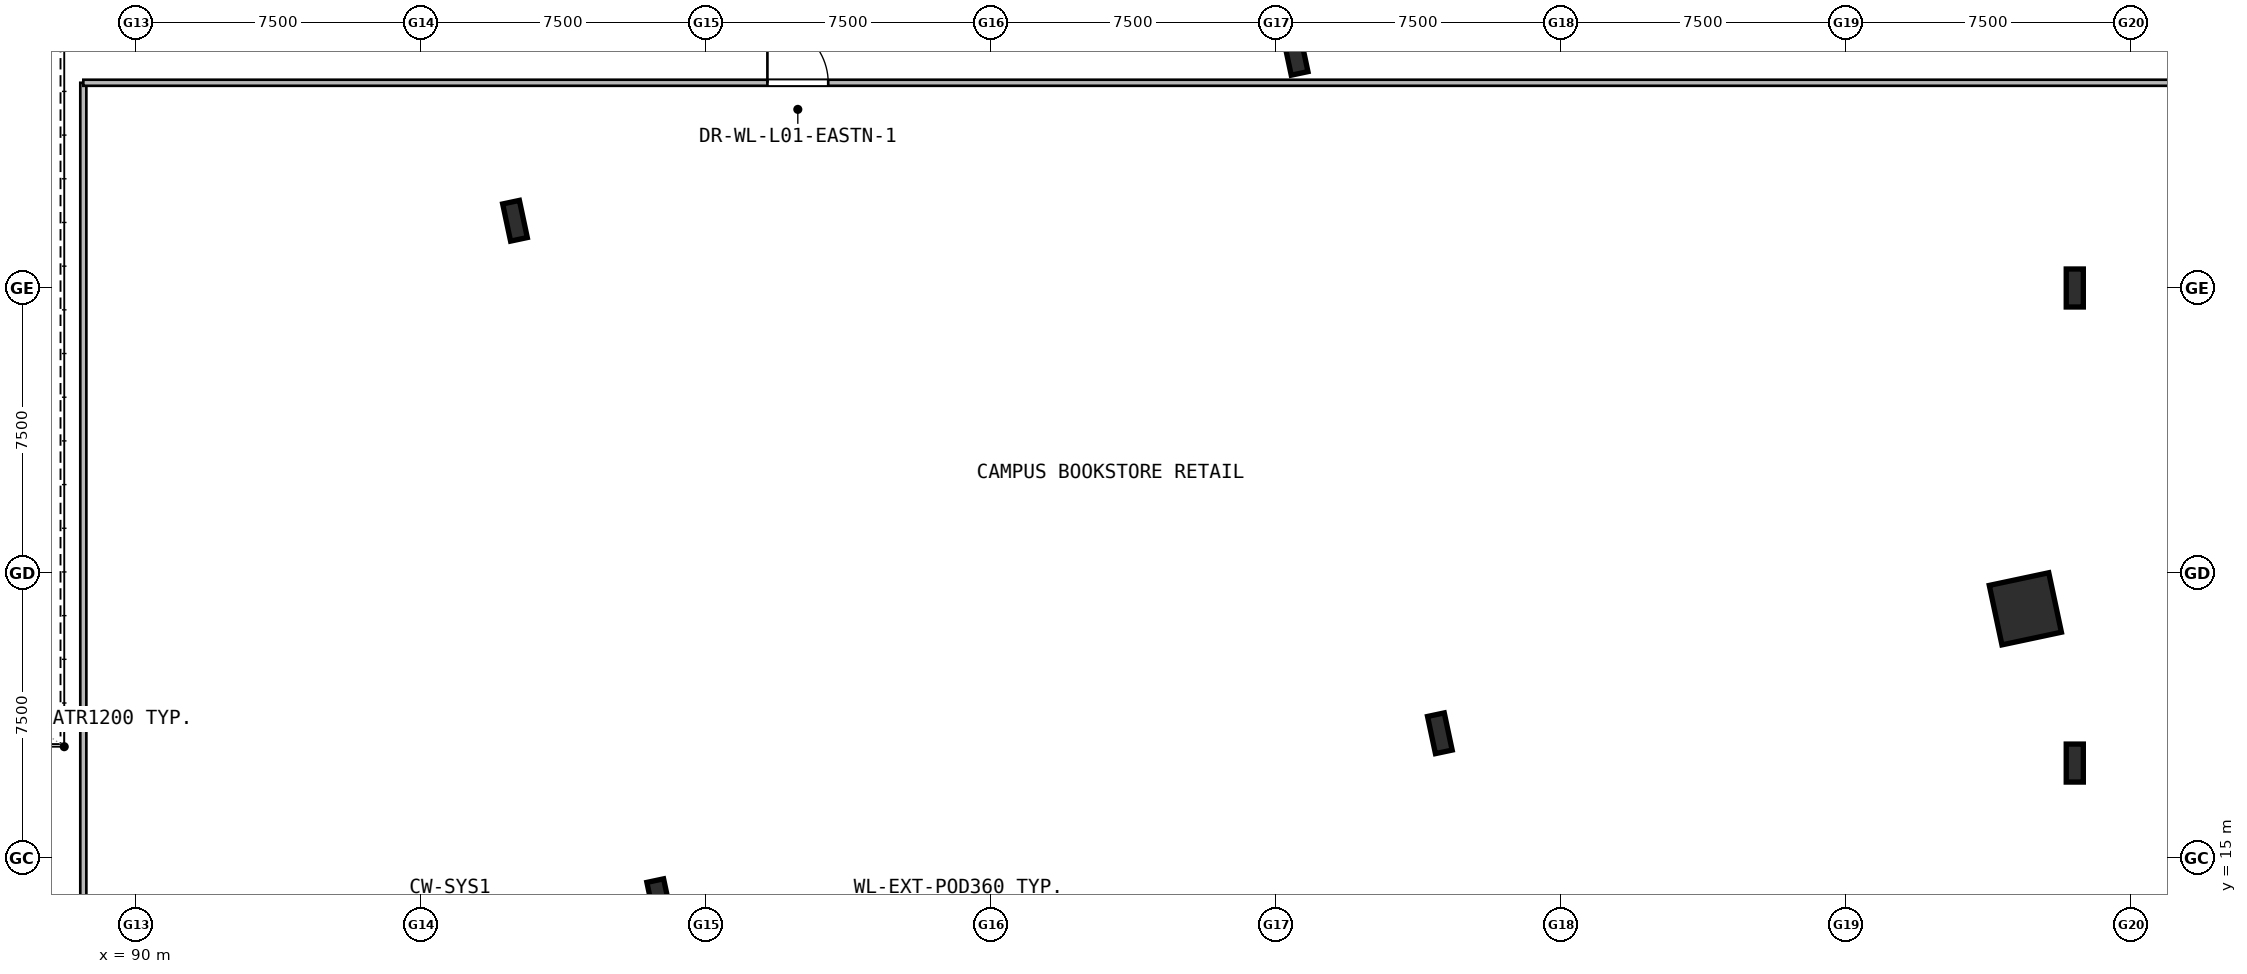
"""IFC4 building model, lengths in metres.
Left out: names, types, materials, properties, quantities, classifications, styles, units other than length and angle.
Written with IfcOpenShell. Run it as: python <this file> out.ifc"""

import sys

from ifc_helpers import new_model, si_unit, direction, frame, frame_2d, origin, origin_2d, place, context, subcontext, project, spatial, rectangle, hollow_rectangle, i_section, extrude, element, fill, save


model = new_model("IFC4")
c1 = context("Model", 3, precision=1e-05, world=origin(), true_north=direction((0.0, 1.0)))
c2 = subcontext(c1, "Body", "Model", "MODEL_VIEW")
j1 = project(units=[si_unit("LENGTHUNIT", "METRE"), si_unit("PLANEANGLEUNIT", "RADIAN")], contexts=[c1])
p1 = place(None, origin())
s1 = spatial("IfcSite", under=j1, at=p1, CompositionType="ELEMENT")
p2 = place(p1, origin())
s2 = spatial("IfcBuilding", under=s1, at=p2, CompositionType="ELEMENT")
p3 = place(p2, frame((0.0, 0.0, 6.0)))
s3 = spatial("IfcBuildingStorey", under=s2, at=p3, CompositionType="ELEMENT", Elevation=6.0)
for number, where, z_axis, x_axis in (
    (1, (103.753, 13.918, 0.0), (0.0, 0.0, 1.0), (0.978, 0.208, 0.0)),
    (2, (99.958, 31.769, 0.0), (0.0, 0.0, 1.0), (0.978, 0.208, 0.0)),
    (3, (124.294, 18.284, 0.0), (0.0, 0.0, 1.0), (0.978, 0.208, 0.0)),
    (4, (120.499, 36.135, 0.0), (0.0, 0.0, 1.0), (0.978, 0.208, 0.0)),
):
    element("IfcColumn", number, at=place(p3, frame(where, z_axis=z_axis, x_axis=x_axis)), inside=s3, PredefinedType="COLUMN", context=c2, shape_type="SweptSolid", body=[
        extrude(i_section(OverallWidth=0.45, OverallDepth=1.0, WebThickness=0.022, FlangeThickness=0.04, at=origin_2d()), origin(), (0.0, 0.0, 1.0), 4.8),
    ])
p4 = place(p3, frame((139.699, 21.559, 0.0), z_axis=(0.0, 0.0, 1.0), x_axis=(0.978147600734, 0.207911690818, 0.0)))
e5 = element("IfcColumn", 5, at=p4, inside=s3, PredefinedType="COLUMN", context=c2, shape_type="SweptSolid", body=[
    extrude(hollow_rectangle(XDim=1.6, YDim=1.6, WallThickness=0.04, at=origin_2d()), origin(), (0.0, 0.0, 1.0), 4.8),
])
for number, where, z_axis, x_axis in (
    (6, (141.0, 17.5, 0.0), (0.0, 0.0, 1.0), (1.0, 0.0, 0.0)),
    (7, (141.0, 30.0, 0.0), (0.0, 0.0, 1.0), (1.0, 0.0, 0.0)),
):
    element("IfcColumn", number, at=place(p3, frame(where, z_axis=z_axis, x_axis=x_axis)), inside=s3, PredefinedType="COLUMN", context=c2, shape_type="SweptSolid", body=[
        extrude(i_section(OverallWidth=0.45, OverallDepth=1.0, WebThickness=0.022, FlangeThickness=0.04, at=origin_2d()), origin(), (0.0, 0.0, 1.0), 4.8),
    ])
p5 = place(p3, frame((88.6, 13.65, 0.0), z_axis=(0.0, 0.0, 1.0), x_axis=(0.0, 1.0, 0.0)))
e8 = element("IfcWall", 8, at=p5, inside=s3, PredefinedType="PARTITIONING", context=c2, shape_type="SweptSolid", body=[
    extrude(rectangle(XDim=21.75, YDim=0.16, at=frame_2d((10.875, 0.0))), origin(), (0.0, 0.0, 1.0), 4.48),
])
p6 = place(p3, frame((88.6, 35.4, 0.0), z_axis=(0.0, 0.0, 1.0), x_axis=(1.0, 0.0, 0.0)))
e9 = element("IfcWall", 9, at=p6, inside=s3, PredefinedType="PARTITIONING", context=c2, shape_type="SweptSolid", body=[
    extrude(rectangle(XDim=55.25, YDim=0.16, at=frame_2d((27.625, 0.0))), origin(), (0.0, 0.0, 1.0), 3.58),
])
p7 = place(p6, frame((18.0, 0.0, 0.0)))
e10 = element("IfcOpeningElement", 10, at=p7, cuts=e9, PredefinedType="OPENING", context=c2, shape_type="SweptSolid", body=[
    extrude(rectangle(XDim=1.6, YDim=2.2, at=frame_2d((0.8, 1.1))), frame((0.0, 0.09, 0.0), z_axis=(0.0, -1.0, 0.0), x_axis=(1.0, 0.0, 0.0)), (0.0, 0.0, 1.0), 0.18),
])
p8 = place(p7, origin())
e11 = element("IfcDoor", 11, at=p8, inside=s3, OperationType="DOUBLE_DOOR_SINGLE_SWING", PredefinedType="DOOR", context=c2, shape_type="SweptSolid", body=[
    extrude(rectangle(XDim=1.6, YDim=2.2, at=frame_2d((0.8, 1.1))), frame((0.0, 0.025, 0.0), z_axis=(0.0, -1.0, 0.0), x_axis=(1.0, 0.0, 0.0)), (0.0, 0.0, 1.0), 0.05),
])
fill(e10, e11)
save(model, sys.argv[1])
